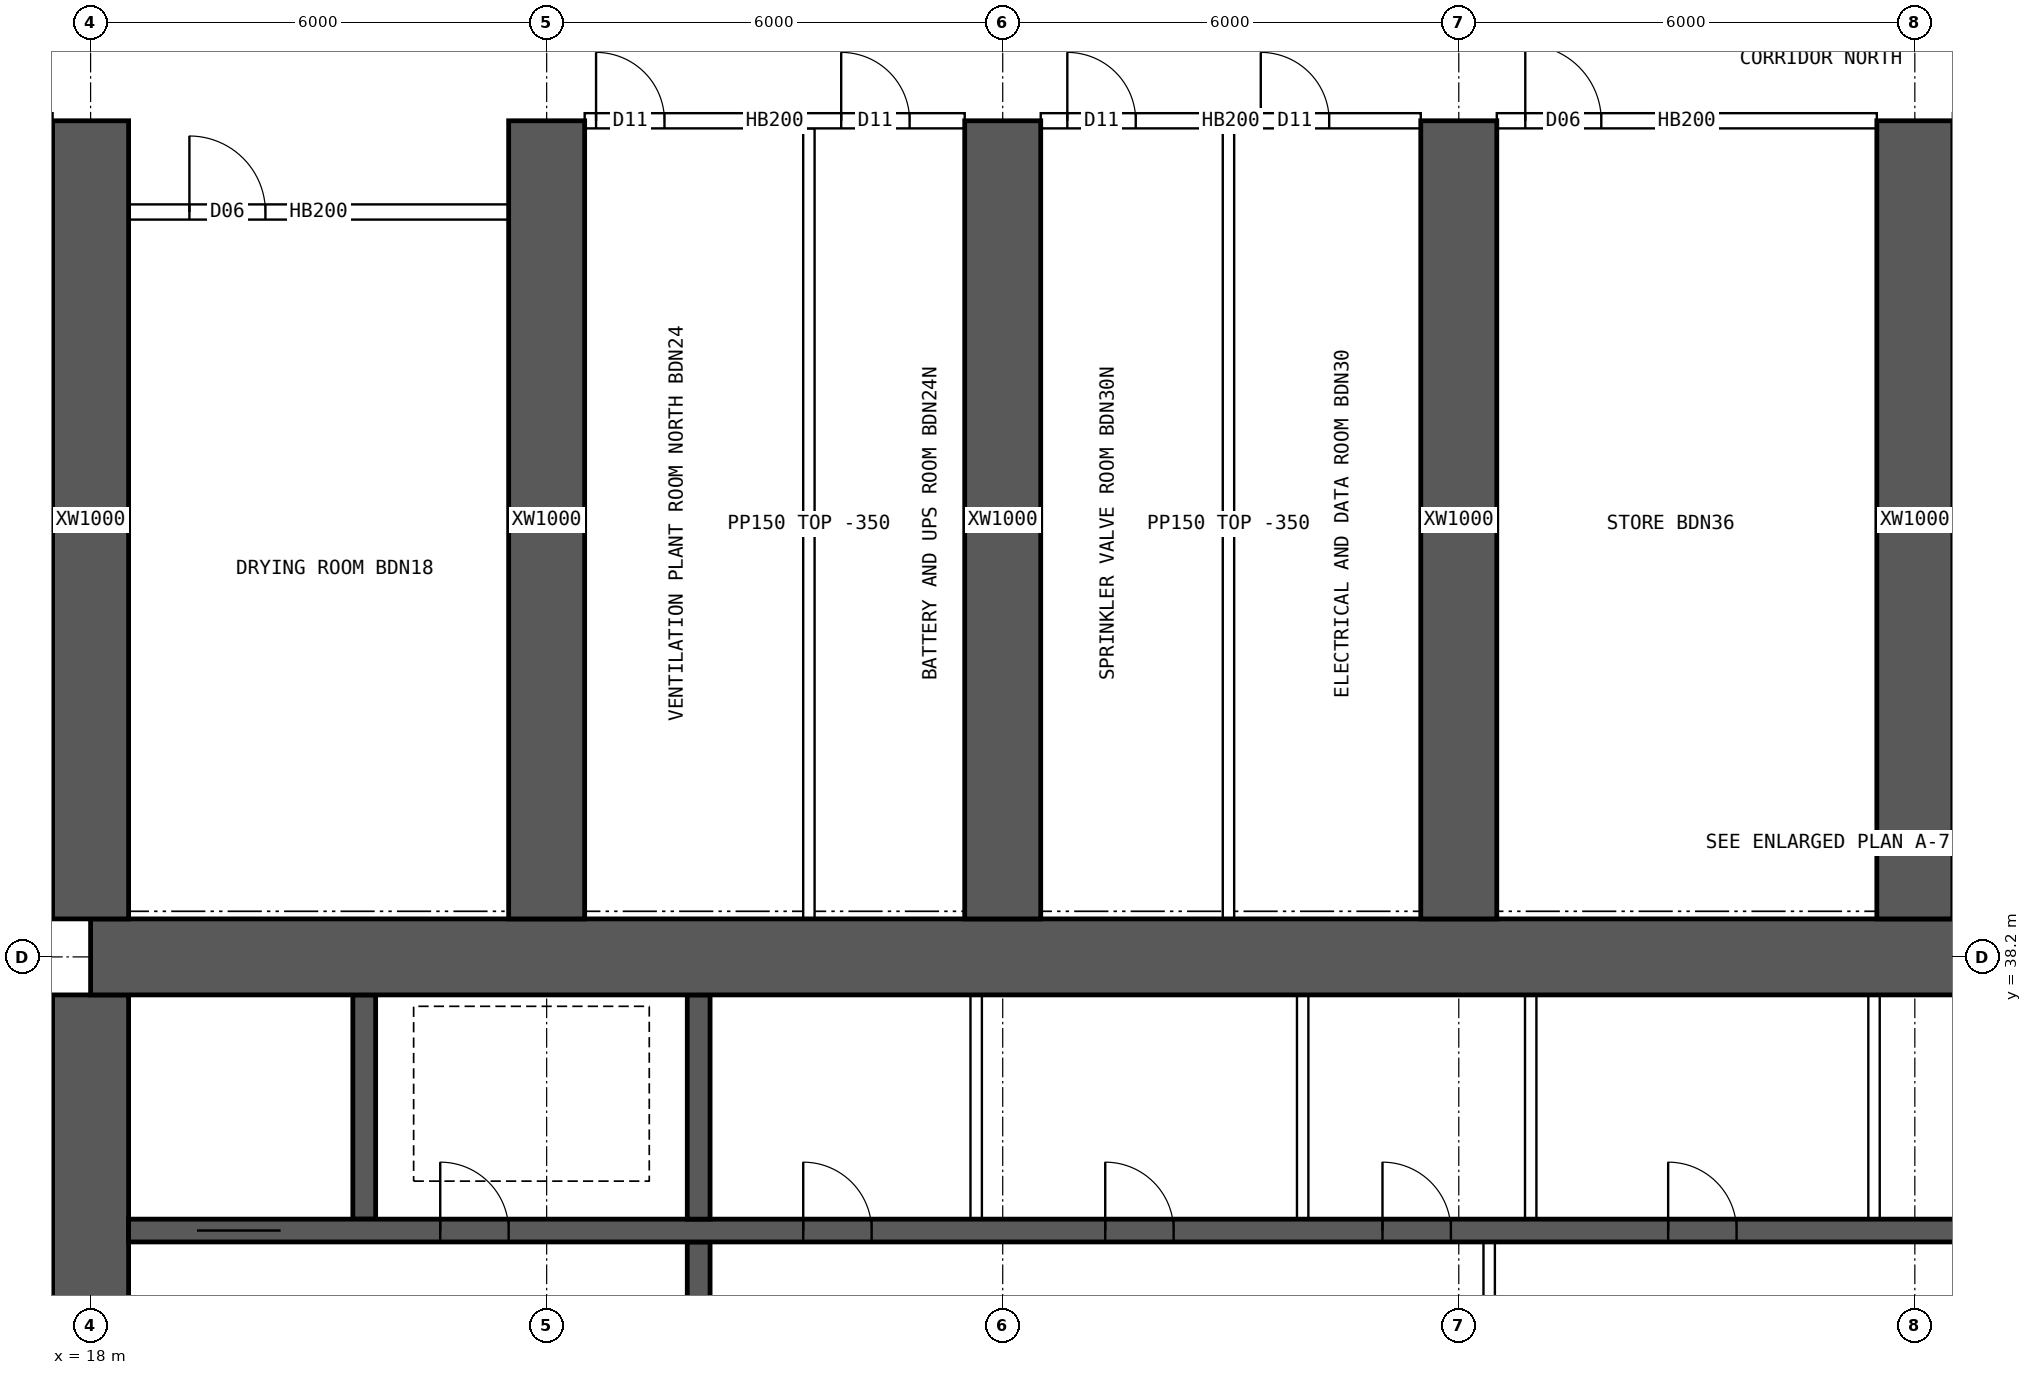
"""IFC4 building model, lengths in metres.
Left out: names, types, materials, properties, quantities, classifications, styles, units other than length and angle.
Written with IfcOpenShell. Run it as: python <this file> out.ifc"""

import sys

from ifc_helpers import new_model, si_unit, direction, frame, frame_2d, origin, place, context, subcontext, project, spatial, rectangle, extrude, element, fill, save


model = new_model("IFC4")
c1 = context("Model", 3, precision=1e-05, world=origin(), true_north=direction((0.0, 1.0)))
c2 = subcontext(c1, "Body", "Model", "MODEL_VIEW")
j1 = project(units=[si_unit("LENGTHUNIT", "METRE"), si_unit("PLANEANGLEUNIT", "RADIAN")], contexts=[c1])
p1 = place(None, origin())
s1 = spatial("IfcSite", under=j1, at=p1, CompositionType="ELEMENT")
p2 = place(p1, origin())
s2 = spatial("IfcBuilding", under=s1, at=p2, CompositionType="ELEMENT")
p3 = place(p2, frame((0.0, 0.0, 65.2)))
s3 = spatial("IfcBuildingStorey", under=s2, at=p3, CompositionType="ELEMENT", Elevation=65.2)
p4 = place(p3, frame((18.0, 38.2, 0.0), z_axis=(0.0, 0.0, 1.0), x_axis=(1.0, 0.0, 0.0)))
e1 = element("IfcWall", 1, at=p4, inside=s3, PredefinedType="SHEAR", context=c2, shape_type="SweptSolid", body=[
    extrude(rectangle(XDim=48.0, YDim=1.0, at=frame_2d((24.0, 0.0))), origin(), (0.0, 0.0, 1.0), 3.75),
])
p5 = place(p3, frame((18.0, 26.3, 0.0), z_axis=(0.0, 0.0, 1.0), x_axis=(0.0, 1.0, 0.0)))
e2 = element("IfcWall", 2, at=p5, inside=s3, PredefinedType="SHEAR", context=c2, shape_type="SweptSolid", body=[
    extrude(rectangle(XDim=11.4, YDim=1.0, at=frame_2d((5.7, 0.0))), origin(), (0.0, 0.0, 1.0), 3.75),
])
p6 = place(p5, frame((5.0, 0.0, 0.0)))
e3 = element("IfcOpeningElement", 3, at=p6, cuts=e2, PredefinedType="OPENING", context=c2, shape_type="SweptSolid", body=[
    extrude(rectangle(XDim=1.2, YDim=2.1, at=frame_2d((0.6, 1.05))), frame((0.0, 0.51, 0.0), z_axis=(0.0, -1.0, 0.0), x_axis=(1.0, 0.0, 0.0)), (0.0, 0.0, 1.0), 1.02),
])
p7 = place(p3, frame((18.5, 34.6, 0.0), z_axis=(0.0, 0.0, 1.0), x_axis=(1.0, 0.0, 0.0)))
e4 = element("IfcWall", 4, at=p7, inside=s3, PredefinedType="SHEAR", context=c2, shape_type="SweptSolid", body=[
    extrude(rectangle(XDim=47.0, YDim=0.3, at=frame_2d((23.5, 0.0))), origin(), (0.0, 0.0, 1.0), 3.75),
])
p8 = place(p7, frame((0.9, 0.0, 0.0)))
e5 = element("IfcOpeningElement", 5, at=p8, cuts=e4, PredefinedType="OPENING", context=c2, shape_type="SweptSolid", body=[
    extrude(rectangle(XDim=1.1, YDim=2.1, at=frame_2d((0.55, 1.05))), frame((0.0, 0.16, 0.0), z_axis=(0.0, -1.0, 0.0), x_axis=(1.0, 0.0, 0.0)), (0.0, 0.0, 1.0), 0.32),
])
p9 = place(p7, frame((45.0, 0.0, 0.0)))
e6 = element("IfcOpeningElement", 6, at=p9, cuts=e4, PredefinedType="OPENING", context=c2, shape_type="SweptSolid", body=[
    extrude(rectangle(XDim=1.1, YDim=2.1, at=frame_2d((0.55, 1.05))), frame((0.0, 0.16, 0.0), z_axis=(0.0, -1.0, 0.0), x_axis=(1.0, 0.0, 0.0)), (0.0, 0.0, 1.0), 0.32),
])
p10 = place(p7, frame((4.1, 0.0, 0.0)))
e7 = element("IfcOpeningElement", 7, at=p10, cuts=e4, PredefinedType="OPENING", context=c2, shape_type="SweptSolid", body=[
    extrude(rectangle(XDim=0.9, YDim=2.1, at=frame_2d((0.45, 1.05))), frame((0.0, 0.16, 0.0), z_axis=(0.0, -1.0, 0.0), x_axis=(1.0, 0.0, 0.0)), (0.0, 0.0, 1.0), 0.32),
])
p11 = place(p7, frame((42.0, 0.0, 0.0)))
e8 = element("IfcOpeningElement", 8, at=p11, cuts=e4, PredefinedType="OPENING", context=c2, shape_type="SweptSolid", body=[
    extrude(rectangle(XDim=0.9, YDim=2.1, at=frame_2d((0.45, 1.05))), frame((0.0, 0.16, 0.0), z_axis=(0.0, -1.0, 0.0), x_axis=(1.0, 0.0, 0.0)), (0.0, 0.0, 1.0), 0.32),
])
p12 = place(p7, frame((8.875, 0.0, 0.0)))
e9 = element("IfcOpeningElement", 9, at=p12, cuts=e4, PredefinedType="OPENING", context=c2, shape_type="SweptSolid", body=[
    extrude(rectangle(XDim=0.9, YDim=2.1, at=frame_2d((0.45, 1.05))), frame((0.0, 0.16, 0.0), z_axis=(0.0, -1.0, 0.0), x_axis=(1.0, 0.0, 0.0)), (0.0, 0.0, 1.0), 0.32),
])
p13 = place(p7, frame((12.849, 0.0, 0.0)))
e10 = element("IfcOpeningElement", 10, at=p13, cuts=e4, PredefinedType="OPENING", context=c2, shape_type="SweptSolid", body=[
    extrude(rectangle(XDim=0.9, YDim=2.1, at=frame_2d((0.45, 1.05))), frame((0.0, 0.16, 0.0), z_axis=(0.0, -1.0, 0.0), x_axis=(1.0, 0.0, 0.0)), (0.0, 0.0, 1.0), 0.32),
])
p14 = place(p7, frame((16.496, 0.0, 0.0)))
e11 = element("IfcOpeningElement", 11, at=p14, cuts=e4, PredefinedType="OPENING", context=c2, shape_type="SweptSolid", body=[
    extrude(rectangle(XDim=0.9, YDim=2.1, at=frame_2d((0.45, 1.05))), frame((0.0, 0.16, 0.0), z_axis=(0.0, -1.0, 0.0), x_axis=(1.0, 0.0, 0.0)), (0.0, 0.0, 1.0), 0.32),
])
p15 = place(p7, frame((20.255, 0.0, 0.0)))
e12 = element("IfcOpeningElement", 12, at=p15, cuts=e4, PredefinedType="OPENING", context=c2, shape_type="SweptSolid", body=[
    extrude(rectangle(XDim=0.9, YDim=2.1, at=frame_2d((0.45, 1.05))), frame((0.0, 0.16, 0.0), z_axis=(0.0, -1.0, 0.0), x_axis=(1.0, 0.0, 0.0)), (0.0, 0.0, 1.0), 0.32),
])
p16 = place(p7, frame((24.661, 0.0, 0.0)))
e13 = element("IfcOpeningElement", 13, at=p16, cuts=e4, PredefinedType="OPENING", context=c2, shape_type="SweptSolid", body=[
    extrude(rectangle(XDim=0.9, YDim=2.1, at=frame_2d((0.45, 1.05))), frame((0.0, 0.16, 0.0), z_axis=(0.0, -1.0, 0.0), x_axis=(1.0, 0.0, 0.0)), (0.0, 0.0, 1.0), 0.32),
])
p17 = place(p7, frame((27.458, 0.0, 0.0)))
e14 = element("IfcOpeningElement", 14, at=p17, cuts=e4, PredefinedType="OPENING", context=c2, shape_type="SweptSolid", body=[
    extrude(rectangle(XDim=0.9, YDim=2.1, at=frame_2d((0.45, 1.05))), frame((0.0, 0.16, 0.0), z_axis=(0.0, -1.0, 0.0), x_axis=(1.0, 0.0, 0.0)), (0.0, 0.0, 1.0), 0.32),
])
p18 = place(p7, frame((29.831, 0.0, 0.0)))
e15 = element("IfcOpeningElement", 15, at=p18, cuts=e4, PredefinedType="OPENING", context=c2, shape_type="SweptSolid", body=[
    extrude(rectangle(XDim=0.9, YDim=2.1, at=frame_2d((0.45, 1.05))), frame((0.0, 0.16, 0.0), z_axis=(0.0, -1.0, 0.0), x_axis=(1.0, 0.0, 0.0)), (0.0, 0.0, 1.0), 0.32),
])
p19 = place(p7, frame((33.68, 0.0, 0.0)))
e16 = element("IfcOpeningElement", 16, at=p19, cuts=e4, PredefinedType="OPENING", context=c2, shape_type="SweptSolid", body=[
    extrude(rectangle(XDim=0.9, YDim=2.1, at=frame_2d((0.45, 1.05))), frame((0.0, 0.16, 0.0), z_axis=(0.0, -1.0, 0.0), x_axis=(1.0, 0.0, 0.0)), (0.0, 0.0, 1.0), 0.32),
])
p20 = place(p7, frame((37.429, 0.0, 0.0)))
e17 = element("IfcOpeningElement", 17, at=p20, cuts=e4, PredefinedType="OPENING", context=c2, shape_type="SweptSolid", body=[
    extrude(rectangle(XDim=0.9, YDim=2.1, at=frame_2d((0.45, 1.05))), frame((0.0, 0.16, 0.0), z_axis=(0.0, -1.0, 0.0), x_axis=(1.0, 0.0, 0.0)), (0.0, 0.0, 1.0), 0.32),
])
p21 = place(p3, frame((26.0, 30.55, 0.0), z_axis=(0.0, 0.0, 1.0), x_axis=(0.0, 1.0, 0.0)))
e18 = element("IfcWall", 18, at=p21, inside=s3, PredefinedType="SHEAR", context=c2, shape_type="SweptSolid", body=[
    extrude(rectangle(XDim=3.9, YDim=0.3, at=frame_2d((1.95, 0.0))), origin(), (0.0, 0.0, 1.0), 3.75),
])
p22 = place(p21, frame((1.4, 0.0, 0.0)))
e19 = element("IfcOpeningElement", 19, at=p22, cuts=e18, PredefinedType="OPENING", context=c2, shape_type="SweptSolid", body=[
    extrude(rectangle(XDim=1.2, YDim=2.1, at=frame_2d((0.6, 1.05))), frame((0.0, 0.16, 0.0), z_axis=(0.0, -1.0, 0.0), x_axis=(1.0, 0.0, 0.0)), (0.0, 0.0, 1.0), 0.32),
])
for number, where, z_axis, x_axis in (
    (20, (21.6, 34.75, 0.0), (0.0, 0.0, 1.0), (0.0, 1.0, 0.0)),
    (21, (26.0, 34.75, 0.0), (0.0, 0.0, 1.0), (0.0, 1.0, 0.0)),
):
    element("IfcWall", number, at=place(p3, frame(where, z_axis=z_axis, x_axis=x_axis)), inside=s3, PredefinedType="SHEAR", context=c2, shape_type="SweptSolid", body=[
        extrude(rectangle(XDim=2.95, YDim=0.3, at=frame_2d((1.475, 0.0))), origin(), (0.0, 0.0, 1.0), 3.75),
    ])
for number, where, z_axis, x_axis in (
    (22, (18.0, 38.7, 0.0), (0.0, 0.0, 1.0), (0.0, 1.0, 0.0)),
    (23, (24.0, 38.7, 0.0), (0.0, 0.0, 1.0), (0.0, 1.0, 0.0)),
    (24, (30.0, 38.7, 0.0), (0.0, 0.0, 1.0), (0.0, 1.0, 0.0)),
    (25, (36.0, 38.7, 0.0), (0.0, 0.0, 1.0), (0.0, 1.0, 0.0)),
    (26, (42.0, 38.7, 0.0), (0.0, 0.0, 1.0), (0.0, 1.0, 0.0)),
):
    element("IfcWall", number, at=place(p3, frame(where, z_axis=z_axis, x_axis=x_axis)), inside=s3, PredefinedType="SHEAR", context=c2, shape_type="SweptSolid", body=[
        extrude(rectangle(XDim=10.5, YDim=1.0, at=frame_2d((5.25, 0.0))), origin(), (0.0, 0.0, 1.0), 3.75),
    ])
p23 = place(p3, frame((36.4, 30.55, 0.0), z_axis=(0.0, 0.0, 1.0), x_axis=(0.0, 1.0, 0.0)))
e27 = element("IfcWall", 27, at=p23, inside=s3, PredefinedType="SOLIDWALL", context=c2, shape_type="SweptSolid", body=[
    extrude(rectangle(XDim=3.9, YDim=0.15, at=frame_2d((1.95, 0.0))), origin(), (0.0, 0.0, 1.0), 3.4),
])
p24 = place(p23, frame((1.15, 0.0, 0.0)))
e28 = element("IfcOpeningElement", 28, at=p24, cuts=e27, PredefinedType="OPENING", context=c2, shape_type="SweptSolid", body=[
    extrude(rectangle(XDim=1.6, YDim=2.1, at=frame_2d((0.8, 1.05))), frame((0.0, 0.085, 0.0), z_axis=(0.0, -1.0, 0.0), x_axis=(1.0, 0.0, 0.0)), (0.0, 0.0, 1.0), 0.17),
])
for number, where, z_axis, x_axis in (
    (29, (29.651, 34.75, 0.0), (0.0, 0.0, 1.0), (0.0, 1.0, 0.0)),
    (30, (33.946, 34.75, 0.0), (0.0, 0.0, 1.0), (0.0, 1.0, 0.0)),
    (31, (36.946, 34.75, 0.0), (0.0, 0.0, 1.0), (0.0, 1.0, 0.0)),
    (32, (41.463, 34.75, 0.0), (0.0, 0.0, 1.0), (0.0, 1.0, 0.0)),
):
    element("IfcWall", number, at=place(p3, frame(where, z_axis=z_axis, x_axis=x_axis)), inside=s3, PredefinedType="SOLIDWALL", context=c2, shape_type="SweptSolid", body=[
        extrude(rectangle(XDim=2.95, YDim=0.15, at=frame_2d((1.475, 0.0))), origin(), (0.0, 0.0, 1.0), 3.4),
    ])
p25 = place(p3, frame((24.5, 49.2, 0.0), z_axis=(0.0, 0.0, 1.0), x_axis=(1.0, 0.0, 0.0)))
e33 = element("IfcWall", 33, at=p25, inside=s3, PredefinedType="SOLIDWALL", context=c2, shape_type="SweptSolid", body=[
    extrude(rectangle(XDim=5.0, YDim=0.2, at=frame_2d((2.5, 0.0))), origin(), (0.0, 0.0, 1.0), 3.4),
])
p26 = place(p25, frame((0.15, 0.0, 0.0)))
e34 = element("IfcOpeningElement", 34, at=p26, cuts=e33, PredefinedType="OPENING", context=c2, shape_type="SweptSolid", body=[
    extrude(rectangle(XDim=0.9, YDim=2.1, at=frame_2d((0.45, 1.05))), frame((0.0, 0.11, 0.0), z_axis=(0.0, -1.0, 0.0), x_axis=(1.0, 0.0, 0.0)), (0.0, 0.0, 1.0), 0.22),
])
p27 = place(p25, frame((3.375, 0.0, 0.0)))
e35 = element("IfcOpeningElement", 35, at=p27, cuts=e33, PredefinedType="OPENING", context=c2, shape_type="SweptSolid", body=[
    extrude(rectangle(XDim=0.9, YDim=2.1, at=frame_2d((0.45, 1.05))), frame((0.0, 0.11, 0.0), z_axis=(0.0, -1.0, 0.0), x_axis=(1.0, 0.0, 0.0)), (0.0, 0.0, 1.0), 0.22),
])
p28 = place(p3, frame((30.5, 49.2, 0.0), z_axis=(0.0, 0.0, 1.0), x_axis=(1.0, 0.0, 0.0)))
e36 = element("IfcWall", 36, at=p28, inside=s3, PredefinedType="SOLIDWALL", context=c2, shape_type="SweptSolid", body=[
    extrude(rectangle(XDim=5.0, YDim=0.2, at=frame_2d((2.5, 0.0))), origin(), (0.0, 0.0, 1.0), 3.4),
])
p29 = place(p28, frame((0.35, 0.0, 0.0)))
e37 = element("IfcOpeningElement", 37, at=p29, cuts=e36, PredefinedType="OPENING", context=c2, shape_type="SweptSolid", body=[
    extrude(rectangle(XDim=0.9, YDim=2.1, at=frame_2d((0.45, 1.05))), frame((0.0, 0.11, 0.0), z_axis=(0.0, -1.0, 0.0), x_axis=(1.0, 0.0, 0.0)), (0.0, 0.0, 1.0), 0.22),
])
p30 = place(p28, frame((2.895, 0.0, 0.0)))
e38 = element("IfcOpeningElement", 38, at=p30, cuts=e36, PredefinedType="OPENING", context=c2, shape_type="SweptSolid", body=[
    extrude(rectangle(XDim=0.9, YDim=2.1, at=frame_2d((0.45, 1.05))), frame((0.0, 0.11, 0.0), z_axis=(0.0, -1.0, 0.0), x_axis=(1.0, 0.0, 0.0)), (0.0, 0.0, 1.0), 0.22),
])
p31 = place(p3, frame((36.5, 49.2, 0.0), z_axis=(0.0, 0.0, 1.0), x_axis=(1.0, 0.0, 0.0)))
e39 = element("IfcWall", 39, at=p31, inside=s3, PredefinedType="SOLIDWALL", context=c2, shape_type="SweptSolid", body=[
    extrude(rectangle(XDim=5.0, YDim=0.2, at=frame_2d((2.5, 0.0))), origin(), (0.0, 0.0, 1.0), 3.4),
])
p32 = place(p31, frame((0.375, 0.0, 0.0)))
e40 = element("IfcOpeningElement", 40, at=p32, cuts=e39, PredefinedType="OPENING", context=c2, shape_type="SweptSolid", body=[
    extrude(rectangle(XDim=1.0, YDim=2.1, at=frame_2d((0.5, 1.05))), frame((0.0, 0.11, 0.0), z_axis=(0.0, -1.0, 0.0), x_axis=(1.0, 0.0, 0.0)), (0.0, 0.0, 1.0), 0.22),
])
p33 = place(p3, frame((18.5, 48.0, 0.0), z_axis=(0.0, 0.0, 1.0), x_axis=(1.0, 0.0, 0.0)))
e41 = element("IfcWall", 41, at=p33, inside=s3, PredefinedType="SOLIDWALL", context=c2, shape_type="SweptSolid", body=[
    extrude(rectangle(XDim=5.0, YDim=0.2, at=frame_2d((2.5, 0.0))), origin(), (0.0, 0.0, 1.0), 3.4),
])
p34 = place(p33, frame((0.8, 0.0, 0.0)))
e42 = element("IfcOpeningElement", 42, at=p34, cuts=e41, PredefinedType="OPENING", context=c2, shape_type="SweptSolid", body=[
    extrude(rectangle(XDim=1.0, YDim=2.1, at=frame_2d((0.5, 1.05))), frame((0.0, 0.11, 0.0), z_axis=(0.0, -1.0, 0.0), x_axis=(1.0, 0.0, 0.0)), (0.0, 0.0, 1.0), 0.22),
])
for number, where, z_axis, x_axis in (
    (43, (27.45, 38.7, 0.0), (0.0, 0.0, 1.0), (0.0, 1.0, 0.0)),
    (44, (32.97, 38.7, 0.0), (0.0, 0.0, 1.0), (0.0, 1.0, 0.0)),
):
    element("IfcWall", number, at=place(p3, frame(where, z_axis=z_axis, x_axis=x_axis)), inside=s3, PredefinedType="PARTITIONING", context=c2, shape_type="SweptSolid", body=[
        extrude(rectangle(XDim=10.4, YDim=0.15, at=frame_2d((5.2, 0.0))), origin(), (0.0, 0.0, 1.0), 3.4),
    ])
p35 = place(p8, origin())
e45 = element("IfcDoor", 45, at=p35, inside=s3, OperationType="DOUBLE_DOOR_SLIDING", PredefinedType="DOOR", context=c2, shape_type="SweptSolid", body=[
    extrude(rectangle(XDim=1.1, YDim=2.1, at=frame_2d((0.55, 1.05))), frame((0.0, 0.025, 0.0), z_axis=(0.0, -1.0, 0.0), x_axis=(1.0, 0.0, 0.0)), (0.0, 0.0, 1.0), 0.05),
])
fill(e5, e45)
p36 = place(p10, origin())
e46 = element("IfcDoor", 46, at=p36, inside=s3, OperationType="SINGLE_SWING_LEFT", PredefinedType="DOOR", context=c2, shape_type="SweptSolid", body=[
    extrude(rectangle(XDim=0.9, YDim=2.1, at=frame_2d((0.45, 1.05))), frame((0.0, 0.025, 0.0), z_axis=(0.0, -1.0, 0.0), x_axis=(1.0, 0.0, 0.0)), (0.0, 0.0, 1.0), 0.05),
])
fill(e7, e46)
p37 = place(p12, origin())
e47 = element("IfcDoor", 47, at=p37, inside=s3, OperationType="SINGLE_SWING_LEFT", PredefinedType="DOOR", context=c2, shape_type="SweptSolid", body=[
    extrude(rectangle(XDim=0.9, YDim=2.1, at=frame_2d((0.45, 1.05))), frame((0.0, 0.025, 0.0), z_axis=(0.0, -1.0, 0.0), x_axis=(1.0, 0.0, 0.0)), (0.0, 0.0, 1.0), 0.05),
])
fill(e9, e47)
p38 = place(p13, origin())
e48 = element("IfcDoor", 48, at=p38, inside=s3, OperationType="SINGLE_SWING_LEFT", PredefinedType="DOOR", context=c2, shape_type="SweptSolid", body=[
    extrude(rectangle(XDim=0.9, YDim=2.1, at=frame_2d((0.45, 1.05))), frame((0.0, 0.025, 0.0), z_axis=(0.0, -1.0, 0.0), x_axis=(1.0, 0.0, 0.0)), (0.0, 0.0, 1.0), 0.05),
])
fill(e10, e48)
p39 = place(p14, origin())
e49 = element("IfcDoor", 49, at=p39, inside=s3, OperationType="SINGLE_SWING_LEFT", PredefinedType="DOOR", context=c2, shape_type="SweptSolid", body=[
    extrude(rectangle(XDim=0.9, YDim=2.1, at=frame_2d((0.45, 1.05))), frame((0.0, 0.025, 0.0), z_axis=(0.0, -1.0, 0.0), x_axis=(1.0, 0.0, 0.0)), (0.0, 0.0, 1.0), 0.05),
])
fill(e11, e49)
p40 = place(p15, origin())
e50 = element("IfcDoor", 50, at=p40, inside=s3, OperationType="SINGLE_SWING_LEFT", PredefinedType="DOOR", context=c2, shape_type="SweptSolid", body=[
    extrude(rectangle(XDim=0.9, YDim=2.1, at=frame_2d((0.45, 1.05))), frame((0.0, 0.025, 0.0), z_axis=(0.0, -1.0, 0.0), x_axis=(1.0, 0.0, 0.0)), (0.0, 0.0, 1.0), 0.05),
])
fill(e12, e50)
p41 = place(p34, origin())
e51 = element("IfcDoor", 51, at=p41, inside=s3, OperationType="SINGLE_SWING_LEFT", PredefinedType="DOOR", context=c2, shape_type="SweptSolid", body=[
    extrude(rectangle(XDim=1.0, YDim=2.1, at=frame_2d((0.5, 1.05))), frame((0.0, 0.025, 0.0), z_axis=(0.0, -1.0, 0.0), x_axis=(1.0, 0.0, 0.0)), (0.0, 0.0, 1.0), 0.05),
])
fill(e42, e51)
p42 = place(p26, origin())
e52 = element("IfcDoor", 52, at=p42, inside=s3, OperationType="SINGLE_SWING_LEFT", PredefinedType="DOOR", context=c2, shape_type="SweptSolid", body=[
    extrude(rectangle(XDim=0.9, YDim=2.1, at=frame_2d((0.45, 1.05))), frame((0.0, 0.025, 0.0), z_axis=(0.0, -1.0, 0.0), x_axis=(1.0, 0.0, 0.0)), (0.0, 0.0, 1.0), 0.05),
])
fill(e34, e52)
p43 = place(p27, origin())
e53 = element("IfcDoor", 53, at=p43, inside=s3, OperationType="SINGLE_SWING_LEFT", PredefinedType="DOOR", context=c2, shape_type="SweptSolid", body=[
    extrude(rectangle(XDim=0.9, YDim=2.1, at=frame_2d((0.45, 1.05))), frame((0.0, 0.025, 0.0), z_axis=(0.0, -1.0, 0.0), x_axis=(1.0, 0.0, 0.0)), (0.0, 0.0, 1.0), 0.05),
])
fill(e35, e53)
p44 = place(p29, origin())
e54 = element("IfcDoor", 54, at=p44, inside=s3, OperationType="SINGLE_SWING_LEFT", PredefinedType="DOOR", context=c2, shape_type="SweptSolid", body=[
    extrude(rectangle(XDim=0.9, YDim=2.1, at=frame_2d((0.45, 1.05))), frame((0.0, 0.025, 0.0), z_axis=(0.0, -1.0, 0.0), x_axis=(1.0, 0.0, 0.0)), (0.0, 0.0, 1.0), 0.05),
])
fill(e37, e54)
p45 = place(p30, origin())
e55 = element("IfcDoor", 55, at=p45, inside=s3, OperationType="SINGLE_SWING_LEFT", PredefinedType="DOOR", context=c2, shape_type="SweptSolid", body=[
    extrude(rectangle(XDim=0.9, YDim=2.1, at=frame_2d((0.45, 1.05))), frame((0.0, 0.025, 0.0), z_axis=(0.0, -1.0, 0.0), x_axis=(1.0, 0.0, 0.0)), (0.0, 0.0, 1.0), 0.05),
])
fill(e38, e55)
p46 = place(p32, origin())
e56 = element("IfcDoor", 56, at=p46, inside=s3, OperationType="SINGLE_SWING_LEFT", PredefinedType="DOOR", context=c2, shape_type="SweptSolid", body=[
    extrude(rectangle(XDim=1.0, YDim=2.1, at=frame_2d((0.5, 1.05))), frame((0.0, 0.025, 0.0), z_axis=(0.0, -1.0, 0.0), x_axis=(1.0, 0.0, 0.0)), (0.0, 0.0, 1.0), 0.05),
])
fill(e40, e56)
save(model, sys.argv[1])
